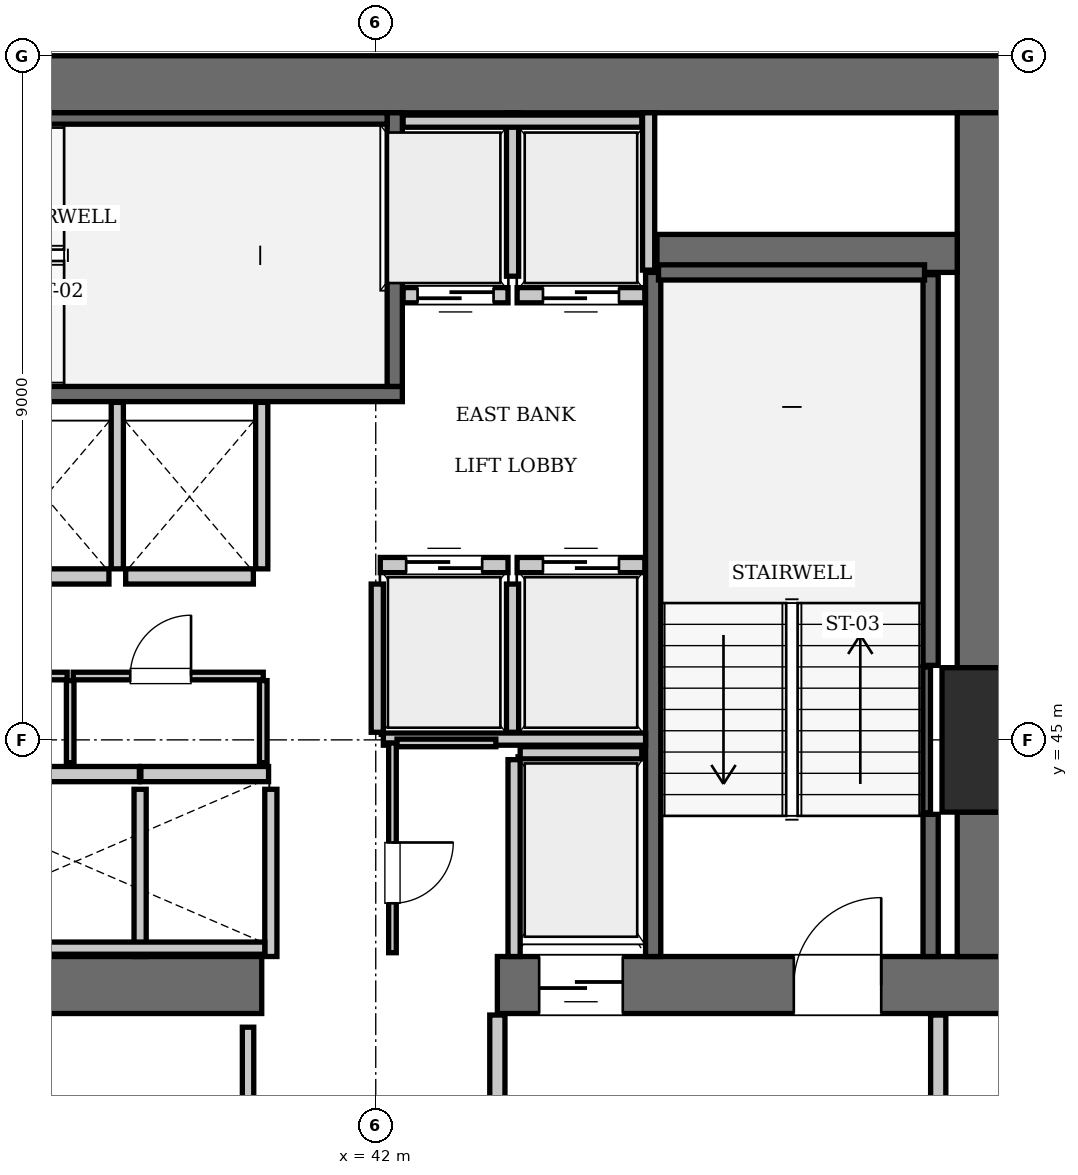
"""IFC4 building model, lengths in metres.
Left out: names, types, materials, properties, quantities, classifications, styles, units other than length and angle.
Written with IfcOpenShell. Run it as: python <this file> out.ifc"""

import sys

from ifc_helpers import new_model, si_unit, direction, frame, frame_2d, origin, origin_2d, place, context, subcontext, project, spatial, rectangle, extrude, element, fill, save


model = new_model("IFC4")
c1 = context("Model", 3, precision=1e-05, world=origin(), true_north=direction((0.0, 1.0)))
c2 = subcontext(c1, "Body", "Model", "MODEL_VIEW")
j1 = project(units=[si_unit("LENGTHUNIT", "METRE"), si_unit("PLANEANGLEUNIT", "RADIAN")], contexts=[c1])
p1 = place(None, origin())
s1 = spatial("IfcSite", under=j1, at=p1, CompositionType="ELEMENT")
p2 = place(p1, origin())
s2 = spatial("IfcBuilding", under=s1, at=p2, CompositionType="ELEMENT")
p3 = place(p2, frame((0.0, 0.0, 181.3)))
s3 = spatial("IfcBuildingStorey", under=s2, at=p3, CompositionType="ELEMENT", Elevation=181.3)
p4 = place(p3, frame((50.4, 45.0, 0.0), z_axis=(0.0, 0.0, 1.0), x_axis=(1.0, 0.0, 0.0)))
e1 = element("IfcColumn", 1, at=p4, inside=s3, PredefinedType="COLUMN", context=c2, shape_type="SweptSolid", body=[
    extrude(rectangle(XDim=1.9, YDim=1.9, at=origin_2d()), origin(), (0.0, 0.0, 1.0), 3.85),
])
p5 = place(p3, frame((25.2, 53.625, 0.0), z_axis=(0.0, 0.0, 1.0), x_axis=(1.0, 0.0, 0.0)))
e2 = element("IfcWall", 2, at=p5, inside=s3, PredefinedType="SHEAR", context=c2, shape_type="SweptSolid", body=[
    extrude(rectangle(XDim=25.2, YDim=0.75, at=frame_2d((12.6, 0.0))), origin(), (0.0, 0.0, 1.0), 3.85),
])
p6 = place(p3, frame((35.1, 41.775, 0.0), z_axis=(0.0, 0.0, 1.0), x_axis=(1.0, 0.0, 0.0)))
e3 = element("IfcWall", 3, at=p6, inside=s3, PredefinedType="SHEAR", context=c2, shape_type="SweptSolid", body=[
    extrude(rectangle(XDim=5.4, YDim=0.75, at=frame_2d((2.7, 0.0))), origin(), (0.0, 0.0, 1.0), 3.85),
])
p7 = place(p3, frame((43.6, 41.775, 0.0), z_axis=(0.0, 0.0, 1.0), x_axis=(1.0, 0.0, 0.0)))
e4 = element("IfcWall", 4, at=p7, inside=s3, PredefinedType="SHEAR", context=c2, shape_type="SweptSolid", body=[
    extrude(rectangle(XDim=6.8, YDim=0.75, at=frame_2d((3.4, 0.0))), origin(), (0.0, 0.0, 1.0), 3.85),
])
p8 = place(p7, frame((3.9, 0.0, 0.0)))
e5 = element("IfcOpeningElement", 5, at=p8, cuts=e4, PredefinedType="OPENING", context=c2, shape_type="SweptSolid", body=[
    extrude(rectangle(XDim=1.15, YDim=2.15, at=frame_2d((0.575, 1.075))), frame((0.0, 0.385, 0.0), z_axis=(0.0, -1.0, 0.0), x_axis=(1.0, 0.0, 0.0)), (0.0, 0.0, 1.0), 0.77),
])
p9 = place(p7, frame((0.55, 0.0, 0.0)))
e6 = element("IfcOpeningElement", 6, at=p9, cuts=e4, PredefinedType="OPENING", context=c2, shape_type="SweptSolid", body=[
    extrude(rectangle(XDim=1.1, YDim=2.2, at=frame_2d((0.55, 1.1))), frame((0.0, 0.385, 0.0), z_axis=(0.0, -1.0, 0.0), x_axis=(1.0, 0.0, 0.0)), (0.0, 0.0, 1.0), 0.77),
])
p10 = place(p3, frame((50.025, 42.15, 0.0), z_axis=(0.0, 0.0, 1.0), x_axis=(0.0, 1.0, 0.0)))
e7 = element("IfcWall", 7, at=p10, inside=s3, PredefinedType="SHEAR", context=c2, shape_type="SweptSolid", body=[
    extrude(rectangle(XDim=1.9, YDim=0.75, at=frame_2d((0.95, 0.0))), origin(), (0.0, 0.0, 1.0), 3.85),
])
p11 = place(p3, frame((50.025, 45.95, 0.0), z_axis=(0.0, 0.0, 1.0), x_axis=(0.0, 1.0, 0.0)))
e8 = element("IfcWall", 8, at=p11, inside=s3, PredefinedType="SHEAR", context=c2, shape_type="SweptSolid", body=[
    extrude(rectangle(XDim=7.3, YDim=0.75, at=frame_2d((3.65, 0.0))), origin(), (0.0, 0.0, 1.0), 3.85),
])
p12 = place(p3, frame((45.7, 51.4, 0.0), z_axis=(0.0, 0.0, 1.0), x_axis=(1.0, 0.0, 0.0)))
e9 = element("IfcWall", 9, at=p12, inside=s3, PredefinedType="SHEAR", context=c2, shape_type="SweptSolid", body=[
    extrude(rectangle(XDim=3.95, YDim=0.5, at=frame_2d((1.975, 0.0))), origin(), (0.0, 0.0, 1.0), 3.85),
])
p13 = place(p3, frame((33.25, 49.55, 0.0), z_axis=(0.0, 0.0, 1.0), x_axis=(1.0, 0.0, 0.0)))
e10 = element("IfcWall", 10, at=p13, inside=s3, PredefinedType="SOLIDWALL", context=c2, shape_type="SweptSolid", body=[
    extrude(rectangle(XDim=9.1, YDim=0.2, at=frame_2d((4.55, 0.0))), origin(), (0.0, 0.0, 1.0), 3.61),
])
p14 = place(p3, frame((42.25, 49.65, 0.0), z_axis=(0.0, 0.0, 1.0), x_axis=(0.0, 1.0, 0.0)))
e11 = element("IfcWall", 11, at=p14, inside=s3, PredefinedType="SOLIDWALL", context=c2, shape_type="SweptSolid", body=[
    extrude(rectangle(XDim=3.6, YDim=0.2, at=frame_2d((1.8, 0.0))), origin(), (0.0, 0.0, 1.0), 3.61),
])
p15 = place(p3, frame((33.45, 53.175, 0.0), z_axis=(0.0, 0.0, 1.0), x_axis=(1.0, 0.0, 0.0)))
e12 = element("IfcWall", 12, at=p15, inside=s3, PredefinedType="SOLIDWALL", context=c2, shape_type="SweptSolid", body=[
    extrude(rectangle(XDim=8.7, YDim=0.15, at=frame_2d((4.35, 0.0))), origin(), (0.0, 0.0, 1.0), 3.61),
])
p16 = place(p3, frame((45.65, 42.15, 0.0), z_axis=(0.0, 0.0, 1.0), x_axis=(0.0, 1.0, 0.0)))
e13 = element("IfcWall", 13, at=p16, inside=s3, PredefinedType="SOLIDWALL", context=c2, shape_type="SweptSolid", body=[
    extrude(rectangle(XDim=9.0, YDim=0.2, at=frame_2d((4.5, 0.0))), origin(), (0.0, 0.0, 1.0), 3.61),
])
p17 = place(p3, frame((49.3, 42.15, 0.0), z_axis=(0.0, 0.0, 1.0), x_axis=(0.0, 1.0, 0.0)))
e14 = element("IfcWall", 14, at=p17, inside=s3, PredefinedType="SOLIDWALL", context=c2, shape_type="SweptSolid", body=[
    extrude(rectangle(XDim=1.87, YDim=0.2, at=frame_2d((0.935, 0.0))), origin(), (0.0, 0.0, 1.0), 3.61),
])
p18 = place(p3, frame((49.3, 45.98, 0.0), z_axis=(0.0, 0.0, 1.0), x_axis=(0.0, 1.0, 0.0)))
e15 = element("IfcWall", 15, at=p18, inside=s3, PredefinedType="SOLIDWALL", context=c2, shape_type="SweptSolid", body=[
    extrude(rectangle(XDim=5.14, YDim=0.2, at=frame_2d((2.57, 0.0))), origin(), (0.0, 0.0, 1.0), 3.61),
])
p19 = place(p3, frame((45.72, 51.15, 0.0), z_axis=(0.0, 0.0, 1.0), x_axis=(1.0, 0.0, 0.0)))
e16 = element("IfcWall", 16, at=p19, inside=s3, PredefinedType="SOLIDWALL", context=c2, shape_type="SweptSolid", body=[
    extrude(rectangle(XDim=3.5, YDim=0.2, at=frame_2d((1.75, 0.0))), origin(), (0.0, 0.0, 1.0), 3.61),
])
p20 = place(p3, frame((49.248, 44.04, 0.0), z_axis=(0.0, 0.0, 1.0), x_axis=(0.0, 1.0, 0.0)))
e17 = element("IfcWall", 17, at=p20, inside=s3, PredefinedType="SOLIDWALL", context=c2, shape_type="SweptSolid", body=[
    extrude(rectangle(XDim=1.92, YDim=0.1, at=frame_2d((0.96, 0.0))), origin(), (0.0, 0.0, 1.0), 3.61),
])
p21 = place(p3, frame((42.06, 47.3, 0.0), z_axis=(0.0, 0.0, 1.0), x_axis=(1.0, 0.0, 0.0)))
e18 = element("IfcWall", 18, at=p21, inside=s3, PredefinedType="SOLIDWALL", context=c2, shape_type="SweptSolid", body=[
    extrude(rectangle(XDim=1.68, YDim=0.2, at=frame_2d((0.84, 0.0))), origin(), (0.0, 0.0, 1.0), 3.61),
])
p22 = place(p21, frame((0.34, 0.0, 0.0)))
e19 = element("IfcOpeningElement", 19, at=p22, cuts=e18, PredefinedType="OPENING", context=c2, shape_type="SweptSolid", body=[
    extrude(rectangle(XDim=1.0, YDim=2.15, at=frame_2d((0.5, 1.075))), frame((0.0, 0.11, 0.0), z_axis=(0.0, -1.0, 0.0), x_axis=(1.0, 0.0, 0.0)), (0.0, 0.0, 1.0), 0.22),
])
p23 = place(p3, frame((43.86, 47.3, 0.0), z_axis=(0.0, 0.0, 1.0), x_axis=(1.0, 0.0, 0.0)))
e20 = element("IfcWall", 20, at=p23, inside=s3, PredefinedType="SOLIDWALL", context=c2, shape_type="SweptSolid", body=[
    extrude(rectangle(XDim=1.68, YDim=0.2, at=frame_2d((0.84, 0.0))), origin(), (0.0, 0.0, 1.0), 3.61),
])
p24 = place(p23, frame((0.34, 0.0, 0.0)))
e21 = element("IfcOpeningElement", 21, at=p24, cuts=e20, PredefinedType="OPENING", context=c2, shape_type="SweptSolid", body=[
    extrude(rectangle(XDim=1.0, YDim=2.15, at=frame_2d((0.5, 1.075))), frame((0.0, 0.11, 0.0), z_axis=(0.0, -1.0, 0.0), x_axis=(1.0, 0.0, 0.0)), (0.0, 0.0, 1.0), 0.22),
])
p25 = place(p3, frame((42.36, 50.85, 0.0), z_axis=(0.0, 0.0, 1.0), x_axis=(1.0, 0.0, 0.0)))
e22 = element("IfcWall", 22, at=p25, inside=s3, PredefinedType="SOLIDWALL", context=c2, shape_type="SweptSolid", body=[
    extrude(rectangle(XDim=1.38, YDim=0.2, at=frame_2d((0.69, 0.0))), origin(), (0.0, 0.0, 1.0), 3.61),
])
p26 = place(p25, frame((0.19, 0.0, 0.0)))
e23 = element("IfcOpeningElement", 23, at=p26, cuts=e22, PredefinedType="OPENING", context=c2, shape_type="SweptSolid", body=[
    extrude(rectangle(XDim=1.0, YDim=2.15, at=frame_2d((0.5, 1.075))), frame((0.0, 0.11, 0.0), z_axis=(0.0, -1.0, 0.0), x_axis=(1.0, 0.0, 0.0)), (0.0, 0.0, 1.0), 0.22),
])
p27 = place(p3, frame((43.86, 50.85, 0.0), z_axis=(0.0, 0.0, 1.0), x_axis=(1.0, 0.0, 0.0)))
e24 = element("IfcWall", 24, at=p27, inside=s3, PredefinedType="SOLIDWALL", context=c2, shape_type="SweptSolid", body=[
    extrude(rectangle(XDim=1.68, YDim=0.2, at=frame_2d((0.84, 0.0))), origin(), (0.0, 0.0, 1.0), 3.61),
])
p28 = place(p27, frame((0.34, 0.0, 0.0)))
e25 = element("IfcOpeningElement", 25, at=p28, cuts=e24, PredefinedType="OPENING", context=c2, shape_type="SweptSolid", body=[
    extrude(rectangle(XDim=1.0, YDim=2.15, at=frame_2d((0.5, 1.075))), frame((0.0, 0.11, 0.0), z_axis=(0.0, -1.0, 0.0), x_axis=(1.0, 0.0, 0.0)), (0.0, 0.0, 1.0), 0.22),
])
p29 = place(p3, frame((37.21, 44.55, 0.0), z_axis=(0.0, 0.0, 1.0), x_axis=(1.0, 0.0, 0.0)))
e26 = element("IfcWall", 26, at=p29, inside=s3, PredefinedType="SOLIDWALL", context=c2, shape_type="SweptSolid", body=[
    extrude(rectangle(XDim=1.68, YDim=0.2, at=frame_2d((0.84, 0.0))), origin(), (0.0, 0.0, 1.0), 3.61),
])
p30 = place(p3, frame((38.91, 44.55, 0.0), z_axis=(0.0, 0.0, 1.0), x_axis=(1.0, 0.0, 0.0)))
e27 = element("IfcWall", 27, at=p30, inside=s3, PredefinedType="SOLIDWALL", context=c2, shape_type="SweptSolid", body=[
    extrude(rectangle(XDim=1.68, YDim=0.2, at=frame_2d((0.84, 0.0))), origin(), (0.0, 0.0, 1.0), 3.61),
])
for number, where, z_axis, x_axis in (
    (28, (36.81, 47.15, 0.0), (0.0, 0.0, 1.0), (1.0, 0.0, 0.0)),
    (29, (38.71, 47.15, 0.0), (0.0, 0.0, 1.0), (1.0, 0.0, 0.0)),
):
    element("IfcWall", number, at=place(p3, frame(where, z_axis=z_axis, x_axis=x_axis)), inside=s3, PredefinedType="SOLIDWALL", context=c2, shape_type="SweptSolid", body=[
        extrude(rectangle(XDim=1.68, YDim=0.2, at=frame_2d((0.84, 0.0))), origin(), (0.0, 0.0, 1.0), 3.61),
    ])
p31 = place(p3, frame((43.9, 44.83, 0.0), z_axis=(0.0, 0.0, 1.0), x_axis=(1.0, 0.0, 0.0)))
e30 = element("IfcWall", 30, at=p31, inside=s3, PredefinedType="SOLIDWALL", context=c2, shape_type="SweptSolid", body=[
    extrude(rectangle(XDim=1.6, YDim=0.16, at=frame_2d((0.8, 0.0))), origin(), (0.0, 0.0, 1.0), 3.61),
])
p32 = place(p3, frame((43.82, 42.15, 0.0), z_axis=(0.0, 0.0, 1.0), x_axis=(0.0, 1.0, 0.0)))
e31 = element("IfcWall", 31, at=p32, inside=s3, PredefinedType="SOLIDWALL", context=c2, shape_type="SweptSolid", body=[
    extrude(rectangle(XDim=2.59, YDim=0.16, at=frame_2d((1.295, 0.0))), origin(), (0.0, 0.0, 1.0), 3.61),
])
for number, where, z_axis, x_axis in (
    (32, (42.02, 45.1, 0.0), (0.0, 0.0, 1.0), (0.0, 1.0, 0.0)),
    (33, (43.8, 45.1, 0.0), (0.0, 0.0, 1.0), (0.0, 1.0, 0.0)),
):
    element("IfcWall", number, at=place(p3, frame(where, z_axis=z_axis, x_axis=x_axis)), inside=s3, PredefinedType="SOLIDWALL", context=c2, shape_type="SweptSolid", body=[
        extrude(rectangle(XDim=1.95, YDim=0.16, at=frame_2d((0.975, 0.0))), origin(), (0.0, 0.0, 1.0), 3.61),
    ])
p33 = place(p3, frame((42.1, 45.01, 0.0), z_axis=(0.0, 0.0, 1.0), x_axis=(1.0, 0.0, 0.0)))
e34 = element("IfcWall", 34, at=p33, inside=s3, PredefinedType="SOLIDWALL", context=c2, shape_type="SweptSolid", body=[
    extrude(rectangle(XDim=3.45, YDim=0.16, at=frame_2d((1.725, 0.0))), origin(), (0.0, 0.0, 1.0), 3.61),
])
p34 = place(p3, frame((45.59, 51.18, 0.0), z_axis=(0.0, 0.0, 1.0), x_axis=(0.0, 1.0, 0.0)))
e35 = element("IfcWall", 35, at=p34, inside=s3, PredefinedType="SOLIDWALL", context=c2, shape_type="SweptSolid", body=[
    extrude(rectangle(XDim=2.07, YDim=0.16, at=frame_2d((1.035, 0.0))), origin(), (0.0, 0.0, 1.0), 3.61),
])
p35 = place(p3, frame((43.8, 51.1, 0.0), z_axis=(0.0, 0.0, 1.0), x_axis=(0.0, 1.0, 0.0)))
e36 = element("IfcWall", 36, at=p35, inside=s3, PredefinedType="SOLIDWALL", context=c2, shape_type="SweptSolid", body=[
    extrude(rectangle(XDim=2.15, YDim=0.16, at=frame_2d((1.075, 0.0))), origin(), (0.0, 0.0, 1.0), 3.61),
])
p36 = place(p3, frame((42.36, 53.14, 0.0), z_axis=(0.0, 0.0, 1.0), x_axis=(1.0, 0.0, 0.0)))
e37 = element("IfcWall", 37, at=p36, inside=s3, PredefinedType="SOLIDWALL", context=c2, shape_type="SweptSolid", body=[
    extrude(rectangle(XDim=3.14, YDim=0.16, at=frame_2d((1.57, 0.0))), origin(), (0.0, 0.0, 1.0), 3.61),
])
for number, where, z_axis, x_axis in (
    (38, (38.9, 42.15, 0.0), (0.0, 0.0, 1.0), (0.0, 1.0, 0.0)),
    (39, (40.62, 42.15, 0.0), (0.0, 0.0, 1.0), (0.0, 1.0, 0.0)),
):
    element("IfcWall", number, at=place(p3, frame(where, z_axis=z_axis, x_axis=x_axis)), inside=s3, PredefinedType="SOLIDWALL", context=c2, shape_type="SweptSolid", body=[
        extrude(rectangle(XDim=2.2, YDim=0.16, at=frame_2d((1.1, 0.0))), origin(), (0.0, 0.0, 1.0), 3.61),
    ])
p37 = place(p3, frame((35.52, 42.26, 0.0), z_axis=(0.0, 0.0, 1.0), x_axis=(1.0, 0.0, 0.0)))
e40 = element("IfcWall", 40, at=p37, inside=s3, PredefinedType="SOLIDWALL", context=c2, shape_type="SweptSolid", body=[
    extrude(rectangle(XDim=5.02, YDim=0.16, at=frame_2d((2.51, 0.0))), origin(), (0.0, 0.0, 1.0), 3.61),
])
for number, where, z_axis, x_axis in (
    (41, (38.6, 47.25, 0.0), (0.0, 0.0, 1.0), (0.0, 1.0, 0.0)),
    (42, (40.5, 47.25, 0.0), (0.0, 0.0, 1.0), (0.0, 1.0, 0.0)),
):
    element("IfcWall", number, at=place(p3, frame(where, z_axis=z_axis, x_axis=x_axis)), inside=s3, PredefinedType="SOLIDWALL", context=c2, shape_type="SweptSolid", body=[
        extrude(rectangle(XDim=2.19, YDim=0.16, at=frame_2d((1.095, 0.0))), origin(), (0.0, 0.0, 1.0), 3.61),
    ])
for number, where, z_axis, x_axis in (
    (43, (43.6, 38.31, 0.0), (0.0, 0.0, 1.0), (0.0, 1.0, 0.0)),
    (44, (49.4, 38.31, 0.0), (0.0, 0.0, 1.0), (0.0, 1.0, 0.0)),
):
    element("IfcWall", number, at=place(p3, frame(where, z_axis=z_axis, x_axis=x_axis)), inside=s3, PredefinedType="PARTITIONING", context=c2, shape_type="SweptSolid", body=[
        extrude(rectangle(XDim=3.07, YDim=0.2, at=frame_2d((1.535, 0.0))), origin(), (0.0, 0.0, 1.0), 3.61),
    ])
p38 = place(p3, frame((35.58, 45.84, 0.0), z_axis=(0.0, 0.0, 1.0), x_axis=(1.0, 0.0, 0.0)))
e45 = element("IfcWall", 45, at=p38, inside=s3, PredefinedType="PARTITIONING", context=c2, shape_type="SweptSolid", body=[
    extrude(rectangle(XDim=2.36, YDim=0.1, at=frame_2d((1.18, 0.0))), origin(), (0.0, 0.0, 1.0), 3.61),
])
p39 = place(p38, frame((0.7, 0.0, 0.0)))
e46 = element("IfcOpeningElement", 46, at=p39, cuts=e45, PredefinedType="OPENING", context=c2, shape_type="SweptSolid", body=[
    extrude(rectangle(XDim=0.8, YDim=2.05, at=frame_2d((0.4, 1.025))), frame((0.0, 0.06, 0.0), z_axis=(0.0, -1.0, 0.0), x_axis=(1.0, 0.0, 0.0)), (0.0, 0.0, 1.0), 0.12),
])
p40 = place(p3, frame((38.02, 45.84, 0.0), z_axis=(0.0, 0.0, 1.0), x_axis=(1.0, 0.0, 0.0)))
e47 = element("IfcWall", 47, at=p40, inside=s3, PredefinedType="PARTITIONING", context=c2, shape_type="SweptSolid", body=[
    extrude(rectangle(XDim=2.5, YDim=0.1, at=frame_2d((1.25, 0.0))), origin(), (0.0, 0.0, 1.0), 3.61),
])
p41 = place(p40, frame((0.75, 0.0, 0.0)))
e48 = element("IfcOpeningElement", 48, at=p41, cuts=e47, PredefinedType="OPENING", context=c2, shape_type="SweptSolid", body=[
    extrude(rectangle(XDim=0.8, YDim=2.05, at=frame_2d((0.4, 1.025))), frame((0.0, 0.06, 0.0), z_axis=(0.0, -1.0, 0.0), x_axis=(1.0, 0.0, 0.0)), (0.0, 0.0, 1.0), 0.12),
])
for number, where, z_axis, x_axis in (
    (49, (37.98, 44.7, 0.0), (0.0, 0.0, 1.0), (0.0, 1.0, 0.0)),
    (50, (40.52, 44.7, 0.0), (0.0, 0.0, 1.0), (0.0, 1.0, 0.0)),
):
    element("IfcWall", number, at=place(p3, frame(where, z_axis=z_axis, x_axis=x_axis)), inside=s3, PredefinedType="PARTITIONING", context=c2, shape_type="SweptSolid", body=[
        extrude(rectangle(XDim=1.08, YDim=0.1, at=frame_2d((0.54, 0.0))), origin(), (0.0, 0.0, 1.0), 3.61),
    ])
p42 = place(p3, frame((42.22, 42.2, 0.0), z_axis=(0.0, 0.0, 1.0), x_axis=(0.0, 1.0, 0.0)))
e51 = element("IfcWall", 51, at=p42, inside=s3, PredefinedType="PARTITIONING", context=c2, shape_type="SweptSolid", body=[
    extrude(rectangle(XDim=2.76, YDim=0.1, at=frame_2d((1.38, 0.0))), origin(), (0.0, 0.0, 1.0), 3.61),
])
p43 = place(p42, frame((0.65, 0.0, 0.0)))
e52 = element("IfcOpeningElement", 52, at=p43, cuts=e51, PredefinedType="OPENING", context=c2, shape_type="SweptSolid", body=[
    extrude(rectangle(XDim=0.8, YDim=2.05, at=frame_2d((0.4, 1.025))), frame((0.0, 0.06, 0.0), z_axis=(0.0, -1.0, 0.0), x_axis=(1.0, 0.0, 0.0)), (0.0, 0.0, 1.0), 0.12),
])
p44 = place(p3, frame((42.28, 44.96, 0.0), z_axis=(0.0, 0.0, 1.0), x_axis=(1.0, 0.0, 0.0)))
e53 = element("IfcWall", 53, at=p44, inside=s3, PredefinedType="PARTITIONING", context=c2, shape_type="SweptSolid", body=[
    extrude(rectangle(XDim=1.3, YDim=0.1, at=frame_2d((0.65, 0.0))), origin(), (0.0, 0.0, 1.0), 3.61),
])
p45 = place(p3, frame((40.32, 38.38, 0.0), z_axis=(0.0, 0.0, 1.0), x_axis=(0.0, 1.0, 0.0)))
e54 = element("IfcWall", 54, at=p45, inside=s3, PredefinedType="PARTITIONING", context=c2, shape_type="SweptSolid", body=[
    extrude(rectangle(XDim=2.84, YDim=0.15, at=frame_2d((1.42, 0.0))), origin(), (0.0, 0.0, 1.0), 3.61),
])
p46 = place(p8, origin())
e55 = element("IfcDoor", 55, at=p46, inside=s3, OperationType="SINGLE_SWING_RIGHT", PredefinedType="DOOR", context=c2, shape_type="SweptSolid", body=[
    extrude(rectangle(XDim=1.15, YDim=2.15, at=frame_2d((0.575, 1.075))), frame((0.0, 0.025, 0.0), z_axis=(0.0, -1.0, 0.0), x_axis=(1.0, 0.0, 0.0)), (0.0, 0.0, 1.0), 0.05),
])
fill(e5, e55)
p47 = place(p22, origin())
e56 = element("IfcDoor", 56, at=p47, inside=s3, OperationType="SLIDING_TO_LEFT", PredefinedType="DOOR", context=c2, shape_type="SweptSolid", body=[
    extrude(rectangle(XDim=1.0, YDim=2.15, at=frame_2d((0.5, 1.075))), frame((0.0, 0.025, 0.0), z_axis=(0.0, -1.0, 0.0), x_axis=(1.0, 0.0, 0.0)), (0.0, 0.0, 1.0), 0.05),
])
fill(e19, e56)
p48 = place(p24, origin())
e57 = element("IfcDoor", 57, at=p48, inside=s3, OperationType="SLIDING_TO_LEFT", PredefinedType="DOOR", context=c2, shape_type="SweptSolid", body=[
    extrude(rectangle(XDim=1.0, YDim=2.15, at=frame_2d((0.5, 1.075))), frame((0.0, 0.025, 0.0), z_axis=(0.0, -1.0, 0.0), x_axis=(1.0, 0.0, 0.0)), (0.0, 0.0, 1.0), 0.05),
])
fill(e21, e57)
p49 = place(p26, frame((1.0, 0.0, 0.0), z_axis=(0.0, 0.0, 1.0), x_axis=(-1.0, 0.0, 0.0)))
e58 = element("IfcDoor", 58, at=p49, inside=s3, OperationType="SLIDING_TO_LEFT", PredefinedType="DOOR", context=c2, shape_type="SweptSolid", body=[
    extrude(rectangle(XDim=1.0, YDim=2.15, at=frame_2d((0.5, 1.075))), frame((0.0, 0.025, 0.0), z_axis=(0.0, -1.0, 0.0), x_axis=(1.0, 0.0, 0.0)), (0.0, 0.0, 1.0), 0.05),
])
fill(e23, e58)
p50 = place(p28, frame((1.0, 0.0, 0.0), z_axis=(0.0, 0.0, 1.0), x_axis=(-1.0, 0.0, 0.0)))
e59 = element("IfcDoor", 59, at=p50, inside=s3, OperationType="SLIDING_TO_LEFT", PredefinedType="DOOR", context=c2, shape_type="SweptSolid", body=[
    extrude(rectangle(XDim=1.0, YDim=2.15, at=frame_2d((0.5, 1.075))), frame((0.0, 0.025, 0.0), z_axis=(0.0, -1.0, 0.0), x_axis=(1.0, 0.0, 0.0)), (0.0, 0.0, 1.0), 0.05),
])
fill(e25, e59)
p51 = place(p9, frame((1.1, 0.0, 0.0), z_axis=(0.0, 0.0, 1.0), x_axis=(-1.0, 0.0, 0.0)))
e60 = element("IfcDoor", 60, at=p51, inside=s3, OperationType="SLIDING_TO_LEFT", PredefinedType="DOOR", context=c2, shape_type="SweptSolid", body=[
    extrude(rectangle(XDim=1.1, YDim=2.2, at=frame_2d((0.55, 1.1))), frame((0.0, 0.025, 0.0), z_axis=(0.0, -1.0, 0.0), x_axis=(1.0, 0.0, 0.0)), (0.0, 0.0, 1.0), 0.05),
])
fill(e6, e60)
p52 = place(p41, origin())
e61 = element("IfcDoor", 61, at=p52, inside=s3, OperationType="SINGLE_SWING_RIGHT", PredefinedType="DOOR", context=c2, shape_type="SweptSolid", body=[
    extrude(rectangle(XDim=0.8, YDim=2.05, at=frame_2d((0.4, 1.025))), frame((0.0, 0.025, 0.0), z_axis=(0.0, -1.0, 0.0), x_axis=(1.0, 0.0, 0.0)), (0.0, 0.0, 1.0), 0.05),
])
fill(e48, e61)
p53 = place(p43, frame((0.8, 0.0, 0.0), z_axis=(0.0, 0.0, 1.0), x_axis=(-1.0, 0.0, 0.0)))
e62 = element("IfcDoor", 62, at=p53, inside=s3, OperationType="SINGLE_SWING_LEFT", PredefinedType="DOOR", context=c2, shape_type="SweptSolid", body=[
    extrude(rectangle(XDim=0.8, YDim=2.05, at=frame_2d((0.4, 1.025))), frame((0.0, 0.025, 0.0), z_axis=(0.0, -1.0, 0.0), x_axis=(1.0, 0.0, 0.0)), (0.0, 0.0, 1.0), 0.05),
])
fill(e52, e62)
save(model, sys.argv[1])
